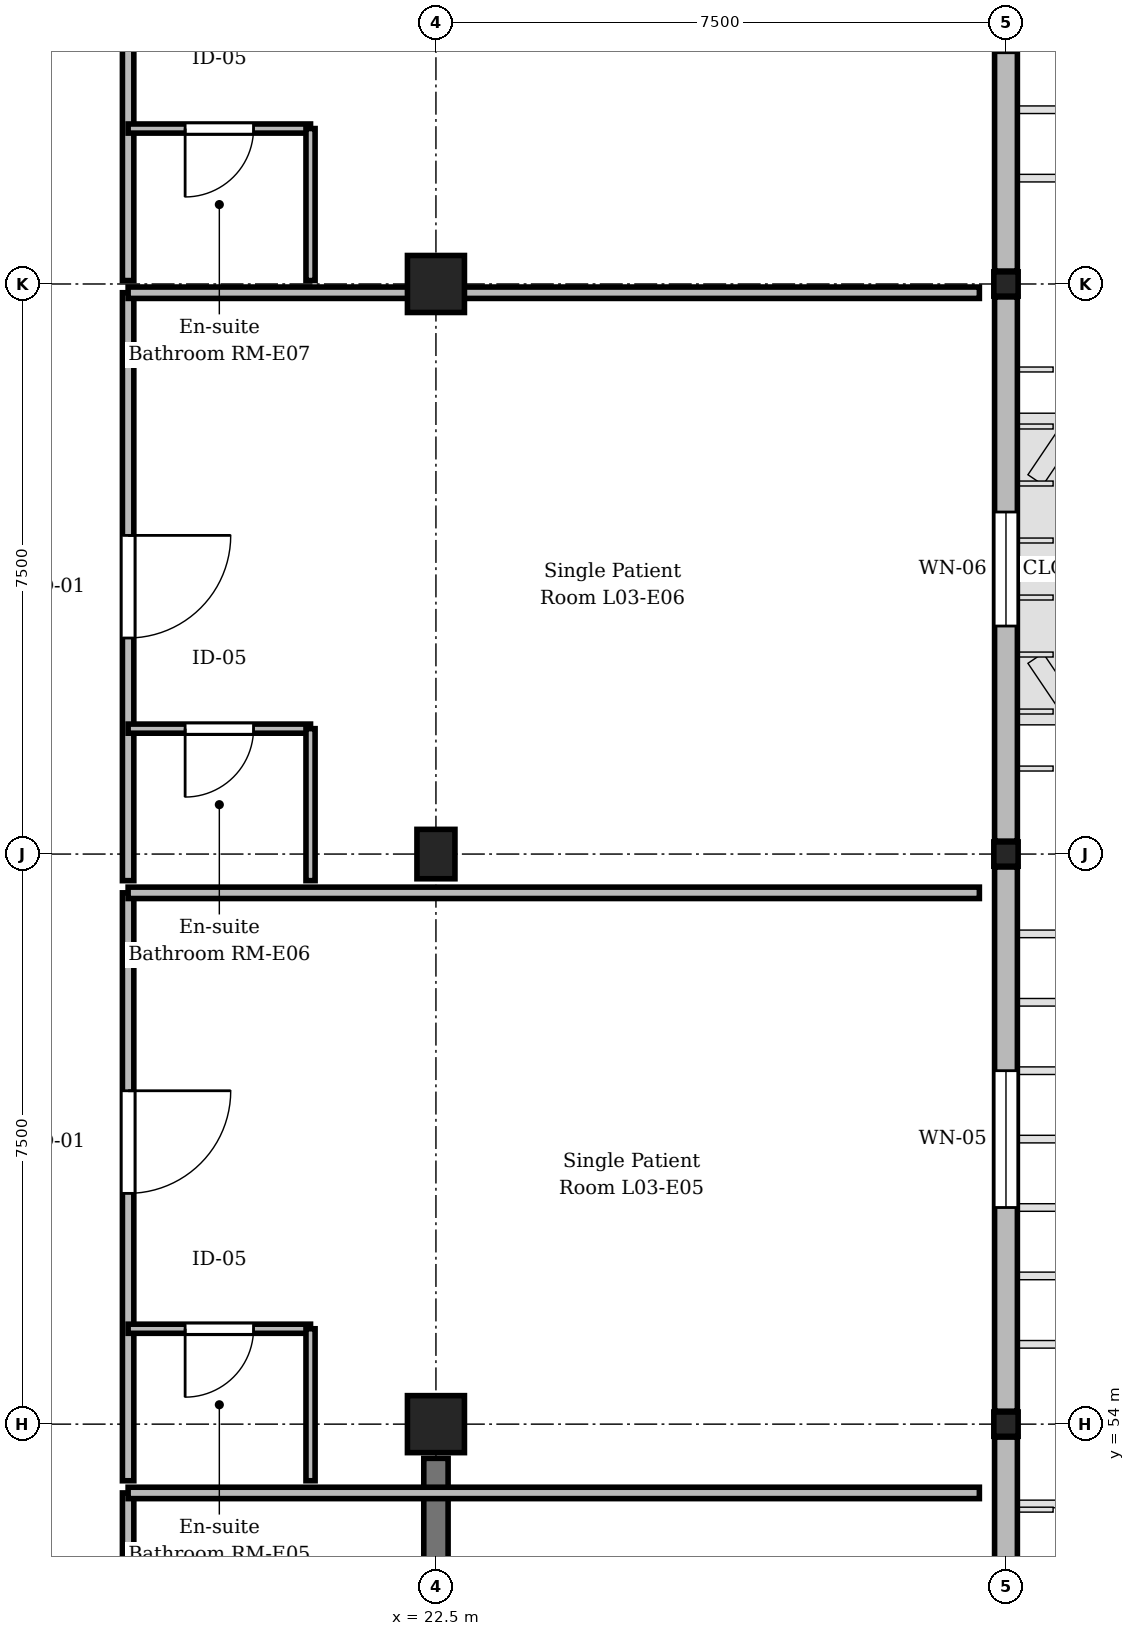
"""IFC4 building model, lengths in metres.
Left out: names, types, materials, properties, quantities, classifications, styles, units other than length and angle.
Written with IfcOpenShell. Run it as: python <this file> out.ifc"""

import sys

from ifc_helpers import new_model, si_unit, direction, frame, frame_2d, origin, origin_2d, place, context, subcontext, project, spatial, rectangle, extrude, element, fill, save


model = new_model("IFC4")
c1 = context("Model", 3, precision=1e-05, world=origin(), true_north=direction((0.0, 1.0)))
c2 = subcontext(c1, "Body", "Model", "MODEL_VIEW")
j1 = project(units=[si_unit("LENGTHUNIT", "METRE"), si_unit("PLANEANGLEUNIT", "RADIAN")], contexts=[c1])
p1 = place(None, origin())
s1 = spatial("IfcSite", under=j1, at=p1, CompositionType="ELEMENT")
p2 = place(p1, origin())
s2 = spatial("IfcBuilding", under=s1, at=p2, CompositionType="ELEMENT")
p3 = place(p2, frame((0.0, 0.0, 14.1)))
s3 = spatial("IfcBuildingStorey", under=s2, at=p3, CompositionType="ELEMENT", Elevation=14.1)
p4 = place(p3, frame((22.5, 54.0, 0.0), z_axis=(0.0, 0.0, 1.0), x_axis=(1.0, 0.0, 0.0)))
e1 = element("IfcColumn", 1, at=p4, inside=s3, PredefinedType="COLUMN", context=c2, shape_type="SweptSolid", body=[
    extrude(rectangle(XDim=0.75, YDim=0.75, at=origin_2d()), origin(), (0.0, 0.0, 1.0), 3.75),
])
p5 = place(p3, frame((22.5, 61.5, 0.0), z_axis=(0.0, 0.0, 1.0), x_axis=(1.0, 0.0, 0.0)))
e2 = element("IfcColumn", 2, at=p5, inside=s3, PredefinedType="COLUMN", context=c2, shape_type="SweptSolid", body=[
    extrude(rectangle(XDim=0.5, YDim=0.65, at=origin_2d()), origin(), (0.0, 0.0, 1.0), 3.75),
])
p6 = place(p3, frame((22.5, 69.0, 0.0), z_axis=(0.0, 0.0, 1.0), x_axis=(1.0, 0.0, 0.0)))
e3 = element("IfcColumn", 3, at=p6, inside=s3, PredefinedType="COLUMN", context=c2, shape_type="SweptSolid", body=[
    extrude(rectangle(XDim=0.75, YDim=0.75, at=origin_2d()), origin(), (0.0, 0.0, 1.0), 3.75),
])
for number, where, z_axis, x_axis in (
    (4, (30.0, 54.0, 0.0), (0.0, 0.0, 1.0), (1.0, 0.0, 0.0)),
    (5, (30.0, 61.5, 0.0), (0.0, 0.0, 1.0), (1.0, 0.0, 0.0)),
    (6, (30.0, 69.0, 0.0), (0.0, 0.0, 1.0), (1.0, 0.0, 0.0)),
):
    element("IfcColumn", number, at=place(p3, frame(where, z_axis=z_axis, x_axis=x_axis)), inside=s3, PredefinedType="COLUMN", context=c2, shape_type="SweptSolid", body=[
        extrude(rectangle(XDim=0.32, YDim=0.32, at=origin_2d()), origin(), (0.0, 0.0, 1.0), 3.75),
    ])
p7 = place(p3, frame((22.5, 46.95, 0.0), z_axis=(0.0, 0.0, 1.0), x_axis=(0.0, 1.0, 0.0)))
e7 = element("IfcWall", 7, at=p7, inside=s3, PredefinedType="SHEAR", context=c2, shape_type="SweptSolid", body=[
    extrude(rectangle(XDim=6.6, YDim=0.32, at=frame_2d((3.3, 0.0))), origin(), (0.0, 0.0, 1.0), 2.92),
])
p8 = place(p3, frame((30.0, 53.83, 0.0), z_axis=(0.0, 0.0, 1.0), x_axis=(0.0, -1.0, 0.0)))
e8 = element("IfcWall", 8, at=p8, inside=s3, PredefinedType="STANDARD", context=c2, shape_type="SweptSolid", body=[
    extrude(rectangle(XDim=7.16, YDim=0.3, at=frame_2d((3.58, 0.0))), origin(), (0.0, 0.0, 1.0), 2.87),
])
p9 = place(p8, frame((2.38, 0.0, 0.9)))
e9 = element("IfcOpeningElement", 9, at=p9, cuts=e8, PredefinedType="OPENING", context=c2, shape_type="SweptSolid", body=[
    extrude(rectangle(XDim=2.4, YDim=1.69, at=frame_2d((1.2, 0.845))), frame((0.0, 0.16, 0.0), z_axis=(0.0, -1.0, 0.0), x_axis=(1.0, 0.0, 0.0)), (0.0, 0.0, 1.0), 0.32),
])
p10 = place(p3, frame((30.0, 61.33, 0.0), z_axis=(0.0, 0.0, 1.0), x_axis=(0.0, -1.0, 0.0)))
e10 = element("IfcWall", 10, at=p10, inside=s3, PredefinedType="STANDARD", context=c2, shape_type="SweptSolid", body=[
    extrude(rectangle(XDim=7.16, YDim=0.3, at=frame_2d((3.58, 0.0))), origin(), (0.0, 0.0, 1.0), 2.87),
])
p11 = place(p10, frame((2.68, 0.0, 0.9)))
e11 = element("IfcOpeningElement", 11, at=p11, cuts=e10, PredefinedType="OPENING", context=c2, shape_type="SweptSolid", body=[
    extrude(rectangle(XDim=1.8, YDim=1.69, at=frame_2d((0.9, 0.845))), frame((0.0, 0.16, 0.0), z_axis=(0.0, -1.0, 0.0), x_axis=(1.0, 0.0, 0.0)), (0.0, 0.0, 1.0), 0.32),
])
p12 = place(p3, frame((30.0, 68.83, 0.0), z_axis=(0.0, 0.0, 1.0), x_axis=(0.0, -1.0, 0.0)))
e12 = element("IfcWall", 12, at=p12, inside=s3, PredefinedType="STANDARD", context=c2, shape_type="SweptSolid", body=[
    extrude(rectangle(XDim=7.16, YDim=0.3, at=frame_2d((3.58, 0.0))), origin(), (0.0, 0.0, 1.0), 2.87),
])
p13 = place(p12, frame((2.83, 0.0, 0.9)))
e13 = element("IfcOpeningElement", 13, at=p13, cuts=e12, PredefinedType="OPENING", context=c2, shape_type="SweptSolid", body=[
    extrude(rectangle(XDim=1.5, YDim=1.69, at=frame_2d((0.75, 0.845))), frame((0.0, 0.16, 0.0), z_axis=(0.0, -1.0, 0.0), x_axis=(1.0, 0.0, 0.0)), (0.0, 0.0, 1.0), 0.32),
])
p14 = place(p3, frame((30.0, 76.115, 0.0), z_axis=(0.0, 0.0, 1.0), x_axis=(0.0, -1.0, 0.0)))
e14 = element("IfcWall", 14, at=p14, inside=s3, PredefinedType="STANDARD", context=c2, shape_type="SweptSolid", body=[
    extrude(rectangle(XDim=6.945, YDim=0.3, at=frame_2d((3.473, 0.0))), origin(), (0.0, 0.0, 1.0), 2.87),
])
p15 = place(p14, frame((2.873, 0.0, 0.9)))
e15 = element("IfcOpeningElement", 15, at=p15, cuts=e14, PredefinedType="OPENING", context=c2, shape_type="SweptSolid", body=[
    extrude(rectangle(XDim=1.2, YDim=1.69, at=frame_2d((0.6, 0.845))), frame((0.0, 0.16, 0.0), z_axis=(0.0, -1.0, 0.0), x_axis=(1.0, 0.0, 0.0)), (0.0, 0.0, 1.0), 0.32),
])
p16 = place(p3, frame((18.45, 53.095, 0.0), z_axis=(0.0, 0.0, 1.0), x_axis=(0.0, -1.0, 0.0)))
e16 = element("IfcWall", 16, at=p16, inside=s3, PredefinedType="PARTITIONING", context=c2, shape_type="SweptSolid", body=[
    extrude(rectangle(XDim=7.735, YDim=0.15, at=frame_2d((3.867, 0.0))), origin(), (0.0, 0.0, 1.0), 3.455),
])
p17 = place(p16, frame((2.015, 0.0, 0.0)))
e17 = element("IfcOpeningElement", 17, at=p17, cuts=e16, PredefinedType="OPENING", context=c2, shape_type="SweptSolid", body=[
    extrude(rectangle(XDim=1.35, YDim=2.25, at=frame_2d((0.675, 1.125))), frame((0.0, 0.085, 0.0), z_axis=(0.0, -1.0, 0.0), x_axis=(1.0, 0.0, 0.0)), (0.0, 0.0, 1.0), 0.17),
])
p18 = place(p3, frame((18.45, 60.99, 0.0), z_axis=(0.0, 0.0, 1.0), x_axis=(0.0, -1.0, 0.0)))
e18 = element("IfcWall", 18, at=p18, inside=s3, PredefinedType="PARTITIONING", context=c2, shape_type="SweptSolid", body=[
    extrude(rectangle(XDim=7.735, YDim=0.15, at=frame_2d((3.868, 0.0))), origin(), (0.0, 0.0, 1.0), 3.455),
])
p19 = place(p18, frame((2.604, 0.0, 0.0)))
e19 = element("IfcOpeningElement", 19, at=p19, cuts=e18, PredefinedType="OPENING", context=c2, shape_type="SweptSolid", body=[
    extrude(rectangle(XDim=1.35, YDim=2.25, at=frame_2d((0.675, 1.125))), frame((0.0, 0.085, 0.0), z_axis=(0.0, -1.0, 0.0), x_axis=(1.0, 0.0, 0.0)), (0.0, 0.0, 1.0), 0.17),
])
p20 = place(p3, frame((20.85, 55.255, 0.0), z_axis=(0.0, 0.0, 1.0), x_axis=(-1.0, 0.0, 0.0)))
e20 = element("IfcWall", 20, at=p20, inside=s3, PredefinedType="PARTITIONING", context=c2, shape_type="SweptSolid", body=[
    extrude(rectangle(XDim=2.4, YDim=0.12, at=frame_2d((1.2, 0.0))), origin(), (0.0, 0.0, 1.0), 3.455),
])
p21 = place(p20, frame((0.75, 0.0, 0.0)))
e21 = element("IfcOpeningElement", 21, at=p21, cuts=e20, PredefinedType="OPENING", context=c2, shape_type="SweptSolid", body=[
    extrude(rectangle(XDim=0.9, YDim=2.1, at=frame_2d((0.45, 1.05))), frame((0.0, 0.07, 0.0), z_axis=(0.0, -1.0, 0.0), x_axis=(1.0, 0.0, 0.0)), (0.0, 0.0, 1.0), 0.14),
])
p22 = place(p3, frame((20.85, 53.255, 0.0), z_axis=(0.0, 0.0, 1.0), x_axis=(0.0, 1.0, 0.0)))
e22 = element("IfcWall", 22, at=p22, inside=s3, PredefinedType="PARTITIONING", context=c2, shape_type="SweptSolid", body=[
    extrude(rectangle(XDim=2.0, YDim=0.12, at=frame_2d((1.0, 0.0))), origin(), (0.0, 0.0, 1.0), 3.455),
])
p23 = place(p3, frame((18.45, 68.885, 0.0), z_axis=(0.0, 0.0, 1.0), x_axis=(0.0, -1.0, 0.0)))
e23 = element("IfcWall", 23, at=p23, inside=s3, PredefinedType="PARTITIONING", context=c2, shape_type="SweptSolid", body=[
    extrude(rectangle(XDim=7.735, YDim=0.15, at=frame_2d((3.868, 0.0))), origin(), (0.0, 0.0, 1.0), 3.455),
])
p24 = place(p23, frame((3.192, 0.0, 0.0)))
e24 = element("IfcOpeningElement", 24, at=p24, cuts=e23, PredefinedType="OPENING", context=c2, shape_type="SweptSolid", body=[
    extrude(rectangle(XDim=1.35, YDim=2.25, at=frame_2d((0.675, 1.125))), frame((0.0, 0.085, 0.0), z_axis=(0.0, -1.0, 0.0), x_axis=(1.0, 0.0, 0.0)), (0.0, 0.0, 1.0), 0.17),
])
p25 = place(p3, frame((20.85, 63.15, 0.0), z_axis=(0.0, 0.0, 1.0), x_axis=(-1.0, 0.0, 0.0)))
e25 = element("IfcWall", 25, at=p25, inside=s3, PredefinedType="PARTITIONING", context=c2, shape_type="SweptSolid", body=[
    extrude(rectangle(XDim=2.4, YDim=0.12, at=frame_2d((1.2, 0.0))), origin(), (0.0, 0.0, 1.0), 3.455),
])
p26 = place(p25, frame((0.75, 0.0, 0.0)))
e26 = element("IfcOpeningElement", 26, at=p26, cuts=e25, PredefinedType="OPENING", context=c2, shape_type="SweptSolid", body=[
    extrude(rectangle(XDim=0.9, YDim=2.1, at=frame_2d((0.45, 1.05))), frame((0.0, 0.07, 0.0), z_axis=(0.0, -1.0, 0.0), x_axis=(1.0, 0.0, 0.0)), (0.0, 0.0, 1.0), 0.14),
])
p27 = place(p3, frame((20.85, 61.15, 0.0), z_axis=(0.0, 0.0, 1.0), x_axis=(0.0, 1.0, 0.0)))
e27 = element("IfcWall", 27, at=p27, inside=s3, PredefinedType="PARTITIONING", context=c2, shape_type="SweptSolid", body=[
    extrude(rectangle(XDim=2.0, YDim=0.12, at=frame_2d((1.0, 0.0))), origin(), (0.0, 0.0, 1.0), 3.455),
])
p28 = place(p3, frame((18.45, 76.78, 0.0), z_axis=(0.0, 0.0, 1.0), x_axis=(0.0, -1.0, 0.0)))
e28 = element("IfcWall", 28, at=p28, inside=s3, PredefinedType="PARTITIONING", context=c2, shape_type="SweptSolid", body=[
    extrude(rectangle(XDim=7.735, YDim=0.15, at=frame_2d((3.868, 0.0))), origin(), (0.0, 0.0, 1.0), 3.455),
])
p29 = place(p28, frame((3.192, 0.0, 0.0)))
e29 = element("IfcOpeningElement", 29, at=p29, cuts=e28, PredefinedType="OPENING", context=c2, shape_type="SweptSolid", body=[
    extrude(rectangle(XDim=1.35, YDim=2.25, at=frame_2d((0.675, 1.125))), frame((0.0, 0.085, 0.0), z_axis=(0.0, -1.0, 0.0), x_axis=(1.0, 0.0, 0.0)), (0.0, 0.0, 1.0), 0.17),
])
p30 = place(p3, frame((20.85, 71.045, 0.0), z_axis=(0.0, 0.0, 1.0), x_axis=(-1.0, 0.0, 0.0)))
e30 = element("IfcWall", 30, at=p30, inside=s3, PredefinedType="PARTITIONING", context=c2, shape_type="SweptSolid", body=[
    extrude(rectangle(XDim=2.4, YDim=0.12, at=frame_2d((1.2, 0.0))), origin(), (0.0, 0.0, 1.0), 3.455),
])
p31 = place(p30, frame((0.75, 0.0, 0.0)))
e31 = element("IfcOpeningElement", 31, at=p31, cuts=e30, PredefinedType="OPENING", context=c2, shape_type="SweptSolid", body=[
    extrude(rectangle(XDim=0.9, YDim=2.1, at=frame_2d((0.45, 1.05))), frame((0.0, 0.07, 0.0), z_axis=(0.0, -1.0, 0.0), x_axis=(1.0, 0.0, 0.0)), (0.0, 0.0, 1.0), 0.14),
])
p32 = place(p3, frame((20.85, 69.045, 0.0), z_axis=(0.0, 0.0, 1.0), x_axis=(0.0, 1.0, 0.0)))
e32 = element("IfcWall", 32, at=p32, inside=s3, PredefinedType="PARTITIONING", context=c2, shape_type="SweptSolid", body=[
    extrude(rectangle(XDim=2.0, YDim=0.12, at=frame_2d((1.0, 0.0))), origin(), (0.0, 0.0, 1.0), 3.455),
])
for number, where, z_axis, x_axis in (
    (33, (18.45, 53.095, 0.0), (0.0, 0.0, 1.0), (1.0, 0.0, 0.0)),
    (34, (18.45, 60.99, 0.0), (0.0, 0.0, 1.0), (1.0, 0.0, 0.0)),
):
    element("IfcWall", number, at=place(p3, frame(where, z_axis=z_axis, x_axis=x_axis)), inside=s3, PredefinedType="PARTITIONING", context=c2, shape_type="SweptSolid", body=[
        extrude(rectangle(XDim=11.2, YDim=0.15, at=frame_2d((5.6, 0.0))), origin(), (0.0, 0.0, 1.0), 3.455),
    ])
p33 = place(p3, frame((18.45, 68.885, 0.0), z_axis=(0.0, 0.0, 1.0), x_axis=(1.0, 0.0, 0.0)))
e35 = element("IfcWall", 35, at=p33, inside=s3, PredefinedType="PARTITIONING", context=c2, shape_type="SweptSolid", body=[
    extrude(rectangle(XDim=11.2, YDim=0.15, at=frame_2d((5.6, 0.0))), origin(), (0.0, 0.0, 1.0), 2.855),
])
p34 = place(p11, origin())
e36 = element("IfcWindow", 36, at=p34, inside=s3, PartitioningType="SINGLE_PANEL", PredefinedType="WINDOW", context=c2, shape_type="SweptSolid", body=[
    extrude(rectangle(XDim=1.8, YDim=1.69, at=frame_2d((0.9, 0.845))), frame((0.0, 0.03, 0.0), z_axis=(0.0, -1.0, 0.0), x_axis=(1.0, 0.0, 0.0)), (0.0, 0.0, 1.0), 0.06),
])
fill(e11, e36)
p35 = place(p13, origin())
e37 = element("IfcWindow", 37, at=p35, inside=s3, PartitioningType="SINGLE_PANEL", PredefinedType="WINDOW", context=c2, shape_type="SweptSolid", body=[
    extrude(rectangle(XDim=1.5, YDim=1.69, at=frame_2d((0.75, 0.845))), frame((0.0, 0.03, 0.0), z_axis=(0.0, -1.0, 0.0), x_axis=(1.0, 0.0, 0.0)), (0.0, 0.0, 1.0), 0.06),
])
fill(e13, e37)
p36 = place(p15, origin())
e38 = element("IfcWindow", 38, at=p36, inside=s3, PartitioningType="SINGLE_PANEL", PredefinedType="WINDOW", context=c2, shape_type="SweptSolid", body=[
    extrude(rectangle(XDim=1.2, YDim=1.69, at=frame_2d((0.6, 0.845))), frame((0.0, 0.03, 0.0), z_axis=(0.0, -1.0, 0.0), x_axis=(1.0, 0.0, 0.0)), (0.0, 0.0, 1.0), 0.06),
])
fill(e15, e38)
p37 = place(p19, origin())
e39 = element("IfcDoor", 39, at=p37, inside=s3, OperationType="SINGLE_SWING_LEFT", PredefinedType="DOOR", context=c2, shape_type="SweptSolid", body=[
    extrude(rectangle(XDim=1.35, YDim=2.25, at=frame_2d((0.675, 1.125))), frame((0.0, 0.025, 0.0), z_axis=(0.0, -1.0, 0.0), x_axis=(1.0, 0.0, 0.0)), (0.0, 0.0, 1.0), 0.05),
])
fill(e19, e39)
p38 = place(p21, origin())
e40 = element("IfcDoor", 40, at=p38, inside=s3, OperationType="SINGLE_SWING_RIGHT", PredefinedType="DOOR", context=c2, shape_type="SweptSolid", body=[
    extrude(rectangle(XDim=0.9, YDim=2.1, at=frame_2d((0.45, 1.05))), frame((0.0, 0.025, 0.0), z_axis=(0.0, -1.0, 0.0), x_axis=(1.0, 0.0, 0.0)), (0.0, 0.0, 1.0), 0.05),
])
fill(e21, e40)
p39 = place(p24, origin())
e41 = element("IfcDoor", 41, at=p39, inside=s3, OperationType="SINGLE_SWING_LEFT", PredefinedType="DOOR", context=c2, shape_type="SweptSolid", body=[
    extrude(rectangle(XDim=1.35, YDim=2.25, at=frame_2d((0.675, 1.125))), frame((0.0, 0.025, 0.0), z_axis=(0.0, -1.0, 0.0), x_axis=(1.0, 0.0, 0.0)), (0.0, 0.0, 1.0), 0.05),
])
fill(e24, e41)
p40 = place(p26, origin())
e42 = element("IfcDoor", 42, at=p40, inside=s3, OperationType="SINGLE_SWING_RIGHT", PredefinedType="DOOR", context=c2, shape_type="SweptSolid", body=[
    extrude(rectangle(XDim=0.9, YDim=2.1, at=frame_2d((0.45, 1.05))), frame((0.0, 0.025, 0.0), z_axis=(0.0, -1.0, 0.0), x_axis=(1.0, 0.0, 0.0)), (0.0, 0.0, 1.0), 0.05),
])
fill(e26, e42)
p41 = place(p31, origin())
e43 = element("IfcDoor", 43, at=p41, inside=s3, OperationType="SINGLE_SWING_RIGHT", PredefinedType="DOOR", context=c2, shape_type="SweptSolid", body=[
    extrude(rectangle(XDim=0.9, YDim=2.1, at=frame_2d((0.45, 1.05))), frame((0.0, 0.025, 0.0), z_axis=(0.0, -1.0, 0.0), x_axis=(1.0, 0.0, 0.0)), (0.0, 0.0, 1.0), 0.05),
])
fill(e31, e43)
save(model, sys.argv[1])
